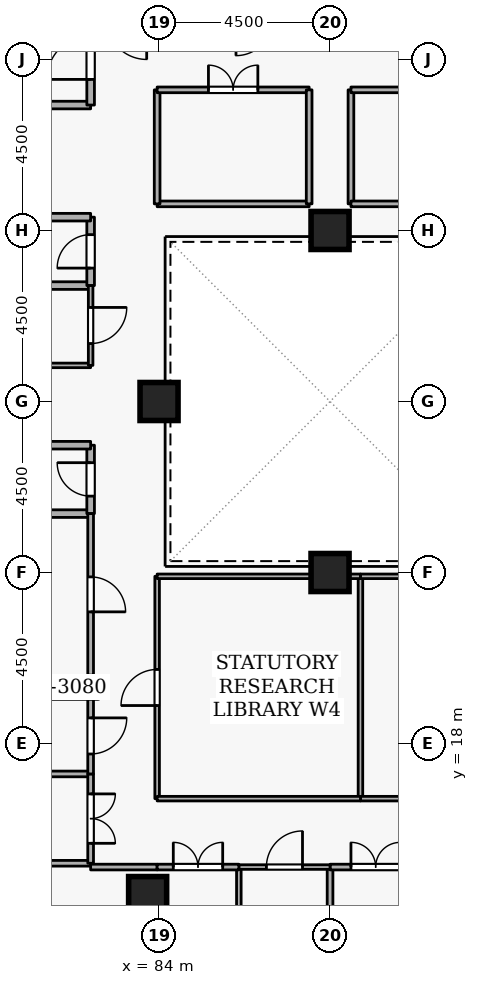
"""IFC4 building model, lengths in metres.
Left out: names, types, materials, properties, quantities, classifications, styles, units other than length and angle.
Written with IfcOpenShell. Run it as: python <this file> out.ifc"""

import sys

from ifc_helpers import new_model, si_unit, direction, frame, frame_2d, origin, origin_2d, place, context, subcontext, project, spatial, rectangle, extrude, element, fill, save


model = new_model("IFC4")
c1 = context("Model", 3, precision=1e-05, world=origin(), true_north=direction((0.0, 1.0)))
c2 = subcontext(c1, "Body", "Model", "MODEL_VIEW")
j1 = project(units=[si_unit("LENGTHUNIT", "METRE"), si_unit("PLANEANGLEUNIT", "RADIAN")], contexts=[c1])
p1 = place(None, origin())
s1 = spatial("IfcSite", under=j1, at=p1, CompositionType="ELEMENT")
p2 = place(p1, origin())
s2 = spatial("IfcBuilding", under=s1, at=p2, CompositionType="ELEMENT")
p3 = place(p2, frame((0.0, 0.0, 251.1)))
s3 = spatial("IfcBuildingStorey", under=s2, at=p3, CompositionType="ELEMENT", Elevation=251.1)
p4 = place(p3, frame((76.6, 19.45, 0.0), z_axis=(0.0, 0.0, 1.0), x_axis=(1.0, 0.0, 0.0)))
e1 = element("IfcWall", 1, at=p4, inside=s3, PredefinedType="SHEAR", context=c2, shape_type="SweptSolid", body=[
    extrude(rectangle(XDim=5.8, YDim=0.5, at=frame_2d((2.9, 0.0))), origin(), (0.0, 0.0, 1.0), 3.6),
])
for number, where, z_axis, x_axis in (
    (2, (83.7, 14.0, 0.0), (0.0, 0.0, 1.0), (1.0, 0.0, 0.0)),
    (3, (84.0, 27.0, 0.0), (0.0, 0.0, 1.0), (1.0, 0.0, 0.0)),
    (4, (88.5, 22.5, 0.0), (0.0, 0.0, 1.0), (1.0, 0.0, 0.0)),
    (5, (88.5, 31.5, 0.0), (0.0, 0.0, 1.0), (1.0, 0.0, 0.0)),
):
    element("IfcColumn", number, at=place(p3, frame(where, z_axis=z_axis, x_axis=x_axis)), inside=s3, PredefinedType="COLUMN", context=c2, shape_type="SweptSolid", body=[
        extrude(rectangle(XDim=1.0, YDim=1.0, at=origin_2d()), origin(), (0.0, 0.0, 1.0), 3.6),
    ])
p5 = place(p3, frame((79.9, 34.8, 0.0), z_axis=(0.0, 0.0, 1.0), x_axis=(1.0, 0.0, 0.0)))
e6 = element("IfcWall", 6, at=p5, inside=s3, PredefinedType="STANDARD", context=c2, shape_type="SweptSolid", body=[
    extrude(rectangle(XDim=2.3, YDim=0.2, at=frame_2d((1.15, 0.0))), origin(), (0.0, 0.0, 1.0), 2.525),
])
p6 = place(p3, frame((82.2, 34.8, 0.0), z_axis=(0.0, 0.0, 1.0), x_axis=(0.0, 1.0, 0.0)))
e7 = element("IfcWall", 7, at=p6, inside=s3, PredefinedType="STANDARD", context=c2, shape_type="SweptSolid", body=[
    extrude(rectangle(XDim=2.5, YDim=0.2, at=frame_2d((1.25, 0.0))), origin(), (0.0, 0.0, 1.0), 3.32),
])
p7 = place(p6, frame((0.675, 0.0, 0.0)))
e8 = element("IfcOpeningElement", 8, at=p7, cuts=e7, PredefinedType="OPENING", context=c2, shape_type="SweptSolid", body=[
    extrude(rectangle(XDim=1.15, YDim=2.1, at=frame_2d((0.575, 1.05))), frame((0.0, 0.11, 0.0), z_axis=(0.0, -1.0, 0.0), x_axis=(1.0, 0.0, 0.0)), (0.0, 0.0, 1.0), 0.22),
])
p8 = place(p3, frame((80.15, 24.05, 0.0), z_axis=(0.0, 0.0, 1.0), x_axis=(1.0, 0.0, 0.0)))
e9 = element("IfcWall", 9, at=p8, inside=s3, PredefinedType="STANDARD", context=c2, shape_type="SweptSolid", body=[
    extrude(rectangle(XDim=2.05, YDim=0.2, at=frame_2d((1.025, 0.0))), origin(), (0.0, 0.0, 1.0), 3.32),
])
p9 = place(p3, frame((82.2, 24.05, 0.0), z_axis=(0.0, 0.0, 1.0), x_axis=(0.0, 1.0, 0.0)))
e10 = element("IfcWall", 10, at=p9, inside=s3, PredefinedType="STANDARD", context=c2, shape_type="SweptSolid", body=[
    extrude(rectangle(XDim=1.8, YDim=0.2, at=frame_2d((0.9, 0.0))), origin(), (0.0, 0.0, 1.0), 3.32),
])
p10 = place(p9, frame((0.46, 0.0, 0.0)))
e11 = element("IfcOpeningElement", 11, at=p10, cuts=e10, PredefinedType="OPENING", context=c2, shape_type="SweptSolid", body=[
    extrude(rectangle(XDim=0.88, YDim=2.04, at=frame_2d((0.44, 1.02))), frame((0.0, 0.11, 0.0), z_axis=(0.0, -1.0, 0.0), x_axis=(1.0, 0.0, 0.0)), (0.0, 0.0, 1.0), 0.22),
])
for number, where, z_axis, x_axis in (
    (12, (82.2, 25.85, 0.0), (0.0, 0.0, 1.0), (-1.0, 0.0, 0.0)),
    (13, (80.15, 30.05, 0.0), (0.0, 0.0, 1.0), (1.0, 0.0, 0.0)),
):
    element("IfcWall", number, at=place(p3, frame(where, z_axis=z_axis, x_axis=x_axis)), inside=s3, PredefinedType="STANDARD", context=c2, shape_type="SweptSolid", body=[
        extrude(rectangle(XDim=2.05, YDim=0.2, at=frame_2d((1.025, 0.0))), origin(), (0.0, 0.0, 1.0), 3.32),
    ])
p11 = place(p3, frame((82.2, 30.05, 0.0), z_axis=(0.0, 0.0, 1.0), x_axis=(0.0, 1.0, 0.0)))
e14 = element("IfcWall", 14, at=p11, inside=s3, PredefinedType="STANDARD", context=c2, shape_type="SweptSolid", body=[
    extrude(rectangle(XDim=1.8, YDim=0.2, at=frame_2d((0.9, 0.0))), origin(), (0.0, 0.0, 1.0), 3.32),
])
p12 = place(p11, frame((0.46, 0.0, 0.0)))
e15 = element("IfcOpeningElement", 15, at=p12, cuts=e14, PredefinedType="OPENING", context=c2, shape_type="SweptSolid", body=[
    extrude(rectangle(XDim=0.88, YDim=2.04, at=frame_2d((0.44, 1.02))), frame((0.0, 0.11, 0.0), z_axis=(0.0, -1.0, 0.0), x_axis=(1.0, 0.0, 0.0)), (0.0, 0.0, 1.0), 0.22),
])
p13 = place(p3, frame((82.2, 31.85, 0.0), z_axis=(0.0, 0.0, 1.0), x_axis=(-1.0, 0.0, 0.0)))
e16 = element("IfcWall", 16, at=p13, inside=s3, PredefinedType="STANDARD", context=c2, shape_type="SweptSolid", body=[
    extrude(rectangle(XDim=2.05, YDim=0.2, at=frame_2d((1.025, 0.0))), origin(), (0.0, 0.0, 1.0), 3.32),
])
p14 = place(p3, frame((82.2, 24.05, 0.0), z_axis=(0.0, 0.0, 1.0), x_axis=(0.0, -1.0, 0.0)))
e17 = element("IfcWall", 17, at=p14, inside=s3, PredefinedType="PARTITIONING", context=c2, shape_type="SweptSolid", body=[
    extrude(rectangle(XDim=4.25, YDim=0.15, at=frame_2d((2.125, 0.0))), origin(), (0.0, 0.0, 1.0), 3.32),
])
p15 = place(p14, frame((1.665, 0.0, 0.0)))
e18 = element("IfcOpeningElement", 18, at=p15, cuts=e17, PredefinedType="OPENING", context=c2, shape_type="SweptSolid", body=[
    extrude(rectangle(XDim=0.92, YDim=2.08, at=frame_2d((0.46, 1.04))), frame((0.0, 0.085, 0.0), z_axis=(0.0, -1.0, 0.0), x_axis=(1.0, 0.0, 0.0)), (0.0, 0.0, 1.0), 0.17),
])
p16 = place(p3, frame((82.2, 27.95, 0.0), z_axis=(0.0, 0.0, 1.0), x_axis=(-1.0, 0.0, 0.0)))
e19 = element("IfcWall", 19, at=p16, inside=s3, PredefinedType="PARTITIONING", context=c2, shape_type="SweptSolid", body=[
    extrude(rectangle(XDim=2.05, YDim=0.12, at=frame_2d((1.025, 0.0))), origin(), (0.0, 0.0, 1.0), 3.32),
])
p17 = place(p3, frame((82.2, 30.05, 0.0), z_axis=(0.0, 0.0, 1.0), x_axis=(0.0, -1.0, 0.0)))
e20 = element("IfcWall", 20, at=p17, inside=s3, PredefinedType="PARTITIONING", context=c2, shape_type="SweptSolid", body=[
    extrude(rectangle(XDim=2.1, YDim=0.12, at=frame_2d((1.05, 0.0))), origin(), (0.0, 0.0, 1.0), 3.32),
])
p18 = place(p17, frame((0.575, 0.0, 0.0)))
e21 = element("IfcOpeningElement", 21, at=p18, cuts=e20, PredefinedType="OPENING", context=c2, shape_type="SweptSolid", body=[
    extrude(rectangle(XDim=0.95, YDim=2.1, at=frame_2d((0.475, 1.05))), frame((0.0, 0.07, 0.0), z_axis=(0.0, -1.0, 0.0), x_axis=(1.0, 0.0, 0.0)), (0.0, 0.0, 1.0), 0.14),
])
for number, where, z_axis, x_axis in (
    (22, (82.2, 14.85, 0.0), (0.0, 0.0, 1.0), (-1.0, 0.0, 0.0)),
    (23, (70.78, 17.2, 0.0), (0.0, 0.0, 1.0), (1.0, 0.0, 0.0)),
):
    element("IfcWall", number, at=place(p3, frame(where, z_axis=z_axis, x_axis=x_axis)), inside=s3, PredefinedType="PARTITIONING", context=c2, shape_type="SweptSolid", body=[
        extrude(rectangle(XDim=11.42, YDim=0.15, at=frame_2d((5.71, 0.0))), origin(), (0.0, 0.0, 1.0), 3.32),
    ])
p19 = place(p3, frame((82.2, 17.2, 0.0), z_axis=(0.0, 0.0, 1.0), x_axis=(0.0, -1.0, 0.0)))
e24 = element("IfcWall", 24, at=p19, inside=s3, PredefinedType="PARTITIONING", context=c2, shape_type="SweptSolid", body=[
    extrude(rectangle(XDim=2.35, YDim=0.15, at=frame_2d((1.175, 0.0))), origin(), (0.0, 0.0, 1.0), 3.32),
])
p20 = place(p19, frame((0.525, 0.0, 0.0)))
e25 = element("IfcOpeningElement", 25, at=p20, cuts=e24, PredefinedType="OPENING", context=c2, shape_type="SweptSolid", body=[
    extrude(rectangle(XDim=1.3, YDim=2.12, at=frame_2d((0.65, 1.06))), frame((0.0, 0.085, 0.0), z_axis=(0.0, -1.0, 0.0), x_axis=(1.0, 0.0, 0.0)), (0.0, 0.0, 1.0), 0.17),
])
p21 = place(p3, frame((82.2, 19.2, 0.0), z_axis=(0.0, 0.0, 1.0), x_axis=(0.0, -1.0, 0.0)))
e26 = element("IfcWall", 26, at=p21, inside=s3, PredefinedType="PARTITIONING", context=c2, shape_type="SweptSolid", body=[
    extrude(rectangle(XDim=2.0, YDim=0.15, at=frame_2d((1.0, 0.0))), origin(), (0.0, 0.0, 1.0), 3.32),
])
p22 = place(p21, frame((0.525, 0.0, 0.0)))
e27 = element("IfcOpeningElement", 27, at=p22, cuts=e26, PredefinedType="OPENING", context=c2, shape_type="SweptSolid", body=[
    extrude(rectangle(XDim=0.95, YDim=2.1, at=frame_2d((0.475, 1.05))), frame((0.0, 0.085, 0.0), z_axis=(0.0, -1.0, 0.0), x_axis=(1.0, 0.0, 0.0)), (0.0, 0.0, 1.0), 0.17),
])
p23 = place(p3, frame((88.5, 3.28, 0.0), z_axis=(0.0, 0.0, 1.0), x_axis=(0.0, 1.0, 0.0)))
e28 = element("IfcWall", 28, at=p23, inside=s3, PredefinedType="PARTITIONING", context=c2, shape_type="SweptSolid", body=[
    extrude(rectangle(XDim=11.47, YDim=0.15, at=frame_2d((5.735, 0.0))), origin(), (0.0, 0.0, 1.0), 2.862),
])
p24 = place(p3, frame((88.5, 14.75, 0.0), z_axis=(0.0, 0.0, 1.0), x_axis=(1.0, 0.0, 0.0)))
e29 = element("IfcWall", 29, at=p24, inside=s3, PredefinedType="PARTITIONING", context=c2, shape_type="SweptSolid", body=[
    extrude(rectangle(XDim=2.4, YDim=0.15, at=frame_2d((1.2, 0.0))), origin(), (0.0, 0.0, 1.0), 3.32),
])
p25 = place(p24, frame((0.55, 0.0, 0.0)))
e30 = element("IfcOpeningElement", 30, at=p25, cuts=e29, PredefinedType="OPENING", context=c2, shape_type="SweptSolid", body=[
    extrude(rectangle(XDim=1.3, YDim=2.12, at=frame_2d((0.65, 1.06))), frame((0.0, 0.085, 0.0), z_axis=(0.0, -1.0, 0.0), x_axis=(1.0, 0.0, 0.0)), (0.0, 0.0, 1.0), 0.17),
])
p26 = place(p3, frame((86.1, 3.28, 0.0), z_axis=(0.0, 0.0, 1.0), x_axis=(0.0, 1.0, 0.0)))
e31 = element("IfcWall", 31, at=p26, inside=s3, PredefinedType="PARTITIONING", context=c2, shape_type="SweptSolid", body=[
    extrude(rectangle(XDim=11.47, YDim=0.12, at=frame_2d((5.735, 0.0))), origin(), (0.0, 0.0, 1.0), 3.32),
])
p27 = place(p3, frame((86.1, 14.75, 0.0), z_axis=(0.0, 0.0, 1.0), x_axis=(1.0, 0.0, 0.0)))
e32 = element("IfcWall", 32, at=p27, inside=s3, PredefinedType="PARTITIONING", context=c2, shape_type="SweptSolid", body=[
    extrude(rectangle(XDim=2.4, YDim=0.12, at=frame_2d((1.2, 0.0))), origin(), (0.0, 0.0, 1.0), 3.32),
])
p28 = place(p27, frame((0.725, 0.0, 0.0)))
e33 = element("IfcOpeningElement", 33, at=p28, cuts=e32, PredefinedType="OPENING", context=c2, shape_type="SweptSolid", body=[
    extrude(rectangle(XDim=0.95, YDim=2.1, at=frame_2d((0.475, 1.05))), frame((0.0, 0.07, 0.0), z_axis=(0.0, -1.0, 0.0), x_axis=(1.0, 0.0, 0.0)), (0.0, 0.0, 1.0), 0.14),
])
p29 = place(p3, frame((82.2, 14.75, 0.0), z_axis=(0.0, 0.0, 1.0), x_axis=(1.0, 0.0, 0.0)))
e34 = element("IfcWall", 34, at=p29, inside=s3, PredefinedType="PARTITIONING", context=c2, shape_type="SweptSolid", body=[
    extrude(rectangle(XDim=1.75, YDim=0.15, at=frame_2d((0.875, 0.0))), origin(), (0.0, 0.0, 1.0), 3.32),
])
p30 = place(p3, frame((83.95, 14.75, 0.0), z_axis=(0.0, 0.0, 1.0), x_axis=(1.0, 0.0, 0.0)))
e35 = element("IfcWall", 35, at=p30, inside=s3, PredefinedType="PARTITIONING", context=c2, shape_type="SweptSolid", body=[
    extrude(rectangle(XDim=2.15, YDim=0.15, at=frame_2d((1.075, 0.0))), origin(), (0.0, 0.0, 1.0), 3.32),
])
p31 = place(p30, frame((0.425, 0.0, 0.0)))
e36 = element("IfcOpeningElement", 36, at=p31, cuts=e35, PredefinedType="OPENING", context=c2, shape_type="SweptSolid", body=[
    extrude(rectangle(XDim=1.3, YDim=2.12, at=frame_2d((0.65, 1.06))), frame((0.0, 0.085, 0.0), z_axis=(0.0, -1.0, 0.0), x_axis=(1.0, 0.0, 0.0)), (0.0, 0.0, 1.0), 0.17),
])
p32 = place(p3, frame((89.3, 16.55, 0.0), z_axis=(0.0, 0.0, 1.0), x_axis=(0.0, 1.0, 0.0)))
e37 = element("IfcWall", 37, at=p32, inside=s3, PredefinedType="PARTITIONING", context=c2, shape_type="SweptSolid", body=[
    extrude(rectangle(XDim=5.85, YDim=0.12, at=frame_2d((2.925, 0.0))), origin(), (0.0, 0.0, 1.0), 3.32),
])
for number, where, z_axis, x_axis in (
    (38, (89.3, 22.4, 0.0), (0.0, 0.0, 1.0), (1.0, 0.0, 0.0)),
    (39, (93.05, 16.55, 0.0), (0.0, 0.0, 1.0), (-1.0, 0.0, 0.0)),
):
    element("IfcWall", number, at=place(p3, frame(where, z_axis=z_axis, x_axis=x_axis)), inside=s3, PredefinedType="PARTITIONING", context=c2, shape_type="SweptSolid", body=[
        extrude(rectangle(XDim=3.75, YDim=0.12, at=frame_2d((1.875, 0.0))), origin(), (0.0, 0.0, 1.0), 3.32),
    ])
p33 = place(p3, frame((83.95, 16.55, 0.0), z_axis=(0.0, 0.0, 1.0), x_axis=(0.0, 1.0, 0.0)))
e40 = element("IfcWall", 40, at=p33, inside=s3, PredefinedType="PARTITIONING", context=c2, shape_type="SweptSolid", body=[
    extrude(rectangle(XDim=5.85, YDim=0.12, at=frame_2d((2.925, 0.0))), origin(), (0.0, 0.0, 1.0), 3.32),
])
p34 = place(p33, frame((2.45, 0.0, 0.0)))
e41 = element("IfcOpeningElement", 41, at=p34, cuts=e40, PredefinedType="OPENING", context=c2, shape_type="SweptSolid", body=[
    extrude(rectangle(XDim=0.95, YDim=2.1, at=frame_2d((0.475, 1.05))), frame((0.0, 0.07, 0.0), z_axis=(0.0, -1.0, 0.0), x_axis=(1.0, 0.0, 0.0)), (0.0, 0.0, 1.0), 0.14),
])
for number, where, z_axis, x_axis in (
    (42, (83.95, 22.4, 0.0), (0.0, 0.0, 1.0), (1.0, 0.0, 0.0)),
    (43, (89.3, 16.55, 0.0), (0.0, 0.0, 1.0), (-1.0, 0.0, 0.0)),
):
    element("IfcWall", number, at=place(p3, frame(where, z_axis=z_axis, x_axis=x_axis)), inside=s3, PredefinedType="PARTITIONING", context=c2, shape_type="SweptSolid", body=[
        extrude(rectangle(XDim=5.35, YDim=0.12, at=frame_2d((2.675, 0.0))), origin(), (0.0, 0.0, 1.0), 3.32),
    ])
p35 = place(p3, frame((89.05, 32.2, 0.0), z_axis=(0.0, 0.0, 1.0), x_axis=(0.0, 1.0, 0.0)))
e44 = element("IfcWall", 44, at=p35, inside=s3, PredefinedType="PARTITIONING", context=c2, shape_type="SweptSolid", body=[
    extrude(rectangle(XDim=3.0, YDim=0.15, at=frame_2d((1.5, 0.0))), origin(), (0.0, 0.0, 1.0), 1.785),
])
p36 = place(p3, frame((89.05, 35.2, 0.0), z_axis=(0.0, 0.0, 1.0), x_axis=(1.0, 0.0, 0.0)))
e45 = element("IfcWall", 45, at=p36, inside=s3, PredefinedType="PARTITIONING", context=c2, shape_type="SweptSolid", body=[
    extrude(rectangle(XDim=4.0, YDim=0.15, at=frame_2d((2.0, 0.0))), origin(), (0.0, 0.0, 1.0), 3.32),
])
p37 = place(p36, frame((1.35, 0.0, 0.0)))
e46 = element("IfcOpeningElement", 46, at=p37, cuts=e45, PredefinedType="OPENING", context=c2, shape_type="SweptSolid", body=[
    extrude(rectangle(XDim=1.3, YDim=2.12, at=frame_2d((0.65, 1.06))), frame((0.0, 0.085, 0.0), z_axis=(0.0, -1.0, 0.0), x_axis=(1.0, 0.0, 0.0)), (0.0, 0.0, 1.0), 0.17),
])
for number, where, z_axis, x_axis in (
    (47, (93.05, 32.2, 0.0), (0.0, 0.0, 1.0), (-1.0, 0.0, 0.0)),
    (48, (87.95, 32.2, 0.0), (0.0, 0.0, 1.0), (-1.0, 0.0, 0.0)),
):
    element("IfcWall", number, at=place(p3, frame(where, z_axis=z_axis, x_axis=x_axis)), inside=s3, PredefinedType="PARTITIONING", context=c2, shape_type="SweptSolid", body=[
        extrude(rectangle(XDim=4.0, YDim=0.15, at=frame_2d((2.0, 0.0))), origin(), (0.0, 0.0, 1.0), 3.32),
    ])
p38 = place(p3, frame((83.95, 32.2, 0.0), z_axis=(0.0, 0.0, 1.0), x_axis=(0.0, 1.0, 0.0)))
e49 = element("IfcWall", 49, at=p38, inside=s3, PredefinedType="PARTITIONING", context=c2, shape_type="SweptSolid", body=[
    extrude(rectangle(XDim=3.0, YDim=0.15, at=frame_2d((1.5, 0.0))), origin(), (0.0, 0.0, 1.0), 3.32),
])
p39 = place(p3, frame((83.95, 35.2, 0.0), z_axis=(0.0, 0.0, 1.0), x_axis=(1.0, 0.0, 0.0)))
e50 = element("IfcWall", 50, at=p39, inside=s3, PredefinedType="PARTITIONING", context=c2, shape_type="SweptSolid", body=[
    extrude(rectangle(XDim=4.0, YDim=0.15, at=frame_2d((2.0, 0.0))), origin(), (0.0, 0.0, 1.0), 3.32),
])
p40 = place(p39, frame((1.35, 0.0, 0.0)))
e51 = element("IfcOpeningElement", 51, at=p40, cuts=e50, PredefinedType="OPENING", context=c2, shape_type="SweptSolid", body=[
    extrude(rectangle(XDim=1.3, YDim=2.12, at=frame_2d((0.65, 1.06))), frame((0.0, 0.085, 0.0), z_axis=(0.0, -1.0, 0.0), x_axis=(1.0, 0.0, 0.0)), (0.0, 0.0, 1.0), 0.17),
])
p41 = place(p3, frame((87.95, 35.2, 0.0), z_axis=(0.0, 0.0, 1.0), x_axis=(0.0, -1.0, 0.0)))
e52 = element("IfcWall", 52, at=p41, inside=s3, PredefinedType="PARTITIONING", context=c2, shape_type="SweptSolid", body=[
    extrude(rectangle(XDim=3.0, YDim=0.15, at=frame_2d((1.5, 0.0))), origin(), (0.0, 0.0, 1.0), 1.785),
])
p42 = place(p7, origin())
e53 = element("IfcDoor", 53, at=p42, inside=s3, OperationType="SINGLE_SWING_LEFT", PredefinedType="DOOR", context=c2, shape_type="SweptSolid", body=[
    extrude(rectangle(XDim=1.15, YDim=2.1, at=frame_2d((0.575, 1.05))), frame((0.0, 0.025, 0.0), z_axis=(0.0, -1.0, 0.0), x_axis=(1.0, 0.0, 0.0)), (0.0, 0.0, 1.0), 0.05),
])
fill(e8, e53)
p43 = place(p10, origin())
e54 = element("IfcDoor", 54, at=p43, inside=s3, OperationType="SINGLE_SWING_RIGHT", PredefinedType="DOOR", context=c2, shape_type="SweptSolid", body=[
    extrude(rectangle(XDim=0.88, YDim=2.04, at=frame_2d((0.44, 1.02))), frame((0.0, 0.025, 0.0), z_axis=(0.0, -1.0, 0.0), x_axis=(1.0, 0.0, 0.0)), (0.0, 0.0, 1.0), 0.05),
])
fill(e11, e54)
p44 = place(p12, origin())
e55 = element("IfcDoor", 55, at=p44, inside=s3, OperationType="SINGLE_SWING_LEFT", PredefinedType="DOOR", context=c2, shape_type="SweptSolid", body=[
    extrude(rectangle(XDim=0.88, YDim=2.04, at=frame_2d((0.44, 1.02))), frame((0.0, 0.025, 0.0), z_axis=(0.0, -1.0, 0.0), x_axis=(1.0, 0.0, 0.0)), (0.0, 0.0, 1.0), 0.05),
])
fill(e15, e55)
p45 = place(p15, origin())
e56 = element("IfcDoor", 56, at=p45, inside=s3, OperationType="SINGLE_SWING_RIGHT", PredefinedType="DOOR", context=c2, shape_type="SweptSolid", body=[
    extrude(rectangle(XDim=0.92, YDim=2.08, at=frame_2d((0.46, 1.04))), frame((0.0, 0.025, 0.0), z_axis=(0.0, -1.0, 0.0), x_axis=(1.0, 0.0, 0.0)), (0.0, 0.0, 1.0), 0.05),
])
fill(e18, e56)
p46 = place(p18, origin())
e57 = element("IfcDoor", 57, at=p46, inside=s3, OperationType="SINGLE_SWING_LEFT", PredefinedType="DOOR", context=c2, shape_type="SweptSolid", body=[
    extrude(rectangle(XDim=0.95, YDim=2.1, at=frame_2d((0.475, 1.05))), frame((0.0, 0.025, 0.0), z_axis=(0.0, -1.0, 0.0), x_axis=(1.0, 0.0, 0.0)), (0.0, 0.0, 1.0), 0.05),
])
fill(e21, e57)
p47 = place(p20, origin())
e58 = element("IfcDoor", 58, at=p47, inside=s3, OperationType="DOUBLE_DOOR_SINGLE_SWING", PredefinedType="DOOR", context=c2, shape_type="SweptSolid", body=[
    extrude(rectangle(XDim=1.3, YDim=2.12, at=frame_2d((0.65, 1.06))), frame((0.0, 0.025, 0.0), z_axis=(0.0, -1.0, 0.0), x_axis=(1.0, 0.0, 0.0)), (0.0, 0.0, 1.0), 0.05),
])
fill(e25, e58)
p48 = place(p22, origin())
e59 = element("IfcDoor", 59, at=p48, inside=s3, OperationType="SINGLE_SWING_LEFT", PredefinedType="DOOR", context=c2, shape_type="SweptSolid", body=[
    extrude(rectangle(XDim=0.95, YDim=2.1, at=frame_2d((0.475, 1.05))), frame((0.0, 0.025, 0.0), z_axis=(0.0, -1.0, 0.0), x_axis=(1.0, 0.0, 0.0)), (0.0, 0.0, 1.0), 0.05),
])
fill(e27, e59)
p49 = place(p25, origin())
e60 = element("IfcDoor", 60, at=p49, inside=s3, OperationType="DOUBLE_DOOR_SINGLE_SWING", PredefinedType="DOOR", context=c2, shape_type="SweptSolid", body=[
    extrude(rectangle(XDim=1.3, YDim=2.12, at=frame_2d((0.65, 1.06))), frame((0.0, 0.025, 0.0), z_axis=(0.0, -1.0, 0.0), x_axis=(1.0, 0.0, 0.0)), (0.0, 0.0, 1.0), 0.05),
])
fill(e30, e60)
p50 = place(p28, origin())
e61 = element("IfcDoor", 61, at=p50, inside=s3, OperationType="SINGLE_SWING_RIGHT", PredefinedType="DOOR", context=c2, shape_type="SweptSolid", body=[
    extrude(rectangle(XDim=0.95, YDim=2.1, at=frame_2d((0.475, 1.05))), frame((0.0, 0.025, 0.0), z_axis=(0.0, -1.0, 0.0), x_axis=(1.0, 0.0, 0.0)), (0.0, 0.0, 1.0), 0.05),
])
fill(e33, e61)
p51 = place(p31, origin())
e62 = element("IfcDoor", 62, at=p51, inside=s3, OperationType="DOUBLE_DOOR_SINGLE_SWING", PredefinedType="DOOR", context=c2, shape_type="SweptSolid", body=[
    extrude(rectangle(XDim=1.3, YDim=2.12, at=frame_2d((0.65, 1.06))), frame((0.0, 0.025, 0.0), z_axis=(0.0, -1.0, 0.0), x_axis=(1.0, 0.0, 0.0)), (0.0, 0.0, 1.0), 0.05),
])
fill(e36, e62)
p52 = place(p34, origin())
e63 = element("IfcDoor", 63, at=p52, inside=s3, OperationType="SINGLE_SWING_LEFT", PredefinedType="DOOR", context=c2, shape_type="SweptSolid", body=[
    extrude(rectangle(XDim=0.95, YDim=2.1, at=frame_2d((0.475, 1.05))), frame((0.0, 0.025, 0.0), z_axis=(0.0, -1.0, 0.0), x_axis=(1.0, 0.0, 0.0)), (0.0, 0.0, 1.0), 0.05),
])
fill(e41, e63)
p53 = place(p40, origin())
e64 = element("IfcDoor", 64, at=p53, inside=s3, OperationType="DOUBLE_DOOR_SINGLE_SWING", PredefinedType="DOOR", context=c2, shape_type="SweptSolid", body=[
    extrude(rectangle(XDim=1.3, YDim=2.12, at=frame_2d((0.65, 1.06))), frame((0.0, 0.025, 0.0), z_axis=(0.0, -1.0, 0.0), x_axis=(1.0, 0.0, 0.0)), (0.0, 0.0, 1.0), 0.05),
])
fill(e51, e64)
save(model, sys.argv[1])
